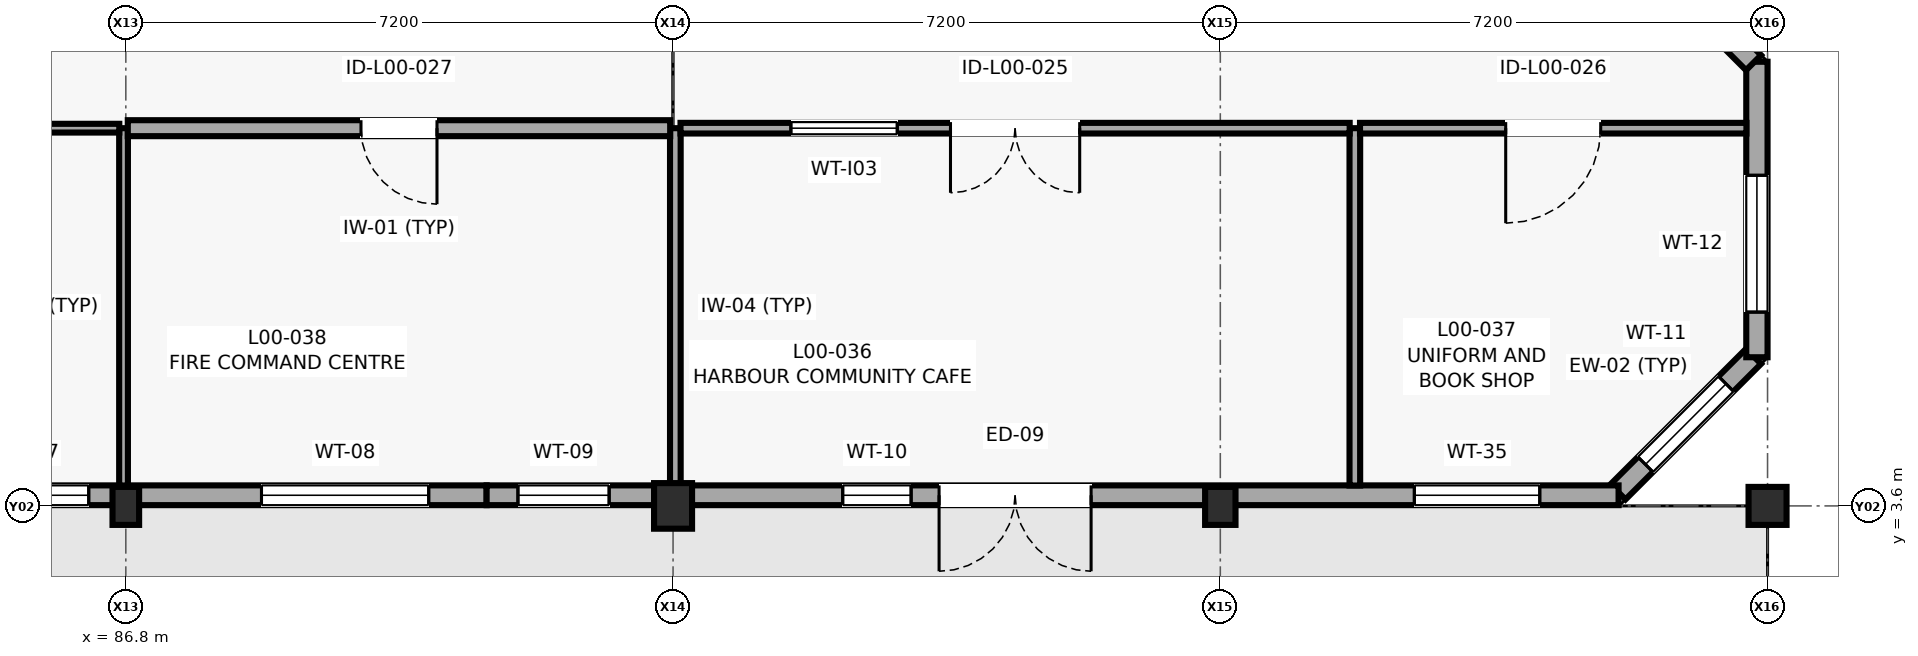
"""IFC4 building model, lengths in metres.
Left out: names, types, materials, properties, quantities, classifications, styles, units other than length and angle.
Written with IfcOpenShell. Run it as: python <this file> out.ifc"""

import sys

from ifc_helpers import new_model, si_unit, direction, frame, frame_2d, origin, origin_2d, place, context, subcontext, project, spatial, rectangle, extrude, element, fill, save


model = new_model("IFC4")
c1 = context("Model", 3, precision=1e-05, world=origin(), true_north=direction((0.0, 1.0)))
c2 = subcontext(c1, "Body", "Model", "MODEL_VIEW")
j1 = project(units=[si_unit("LENGTHUNIT", "METRE"), si_unit("PLANEANGLEUNIT", "RADIAN")], contexts=[c1])
p1 = place(None, origin())
s1 = spatial("IfcSite", under=j1, at=p1, CompositionType="ELEMENT")
p2 = place(p1, origin())
s2 = spatial("IfcBuilding", under=s1, at=p2, CompositionType="ELEMENT")
p3 = place(p2, origin())
s3 = spatial("IfcBuildingStorey", under=s2, at=p3, CompositionType="ELEMENT", Elevation=0.0)
p4 = place(p3, frame((86.8, 3.6, 0.0), z_axis=(0.0, 0.0, 1.0), x_axis=(1.0, 0.0, 0.0)))
e1 = element("IfcColumn", 1, at=p4, inside=s3, PredefinedType="PILASTER", context=c2, shape_type="SweptSolid", body=[
    extrude(rectangle(XDim=0.35, YDim=0.5, at=origin_2d()), origin(), (0.0, 0.0, 1.0), 4.2),
])
p5 = place(p3, frame((94.0, 3.6, 0.0), z_axis=(0.0, 0.0, 1.0), x_axis=(1.0, 0.0, 0.0)))
e2 = element("IfcColumn", 2, at=p5, inside=s3, PredefinedType="PILASTER", context=c2, shape_type="SweptSolid", body=[
    extrude(rectangle(XDim=0.5, YDim=0.6, at=origin_2d()), origin(), (0.0, 0.0, 1.0), 4.2),
])
p6 = place(p3, frame((101.2, 3.6, 0.0), z_axis=(0.0, 0.0, 1.0), x_axis=(1.0, 0.0, 0.0)))
e3 = element("IfcColumn", 3, at=p6, inside=s3, PredefinedType="PILASTER", context=c2, shape_type="SweptSolid", body=[
    extrude(rectangle(XDim=0.4, YDim=0.5, at=origin_2d()), origin(), (0.0, 0.0, 1.0), 4.2),
])
p7 = place(p3, frame((108.4, 3.6, 0.0), z_axis=(0.0, 0.0, 1.0), x_axis=(1.0, 0.0, 0.0)))
e4 = element("IfcColumn", 4, at=p7, inside=s3, PredefinedType="COLUMN", context=c2, shape_type="SweptSolid", body=[
    extrude(rectangle(XDim=0.5, YDim=0.5, at=origin_2d()), origin(), (0.0, 0.0, 1.0), 4.2),
])
p8 = place(p3, frame((106.432, 3.784, 0.0), z_axis=(0.0, 0.0, 1.0), x_axis=(0.707106781187, 0.707106781187, 0.0)))
e5 = element("IfcWall", 5, at=p8, inside=s3, PredefinedType="SOLIDWALL", context=c2, shape_type="SweptSolid", body=[
    extrude(rectangle(XDim=2.523, YDim=0.28, at=frame_2d((1.262, 0.0))), origin(), (0.0, 0.0, 1.0), 3.98),
])
p9 = place(p8, frame((0.511, 0.0, 0.75)))
e6 = element("IfcOpeningElement", 6, at=p9, cuts=e5, PredefinedType="OPENING", context=c2, shape_type="SweptSolid", body=[
    extrude(rectangle(XDim=1.5, YDim=2.2, at=frame_2d((0.75, 1.1))), frame((0.0, 0.15, 0.0), z_axis=(0.0, -1.0, 0.0), x_axis=(1.0, 0.0, 0.0)), (0.0, 0.0, 1.0), 0.3),
])
p10 = place(p3, frame((108.26, 5.556, 0.0), z_axis=(0.0, 0.0, 1.0), x_axis=(0.0, 1.0, 0.0)))
e7 = element("IfcWall", 7, at=p10, inside=s3, PredefinedType="SOLIDWALL", context=c2, shape_type="SweptSolid", body=[
    extrude(rectangle(XDim=3.888, YDim=0.28, at=frame_2d((1.944, 0.0))), origin(), (0.0, 0.0, 1.0), 3.98),
])
p11 = place(p10, frame((0.594, 0.0, 0.75)))
e8 = element("IfcOpeningElement", 8, at=p11, cuts=e7, PredefinedType="OPENING", context=c2, shape_type="SweptSolid", body=[
    extrude(rectangle(XDim=1.8, YDim=2.25, at=frame_2d((0.9, 1.125))), frame((0.0, 0.15, 0.0), z_axis=(0.0, -1.0, 0.0), x_axis=(1.0, 0.0, 0.0)), (0.0, 0.0, 1.0), 0.3),
])
p12 = place(p3, frame((108.216, 9.432, 0.0), z_axis=(0.0, 0.0, 1.0), x_axis=(-0.707106781187, 0.707106781187, 0.0)))
e9 = element("IfcWall", 9, at=p12, inside=s3, PredefinedType="SOLIDWALL", context=c2, shape_type="SweptSolid", body=[
    extrude(rectangle(XDim=2.523, YDim=0.28, at=frame_2d((1.262, 0.0))), origin(), (0.0, 0.0, 1.0), 3.98),
])
p13 = place(p12, frame((0.561, 0.0, 0.75)))
e10 = element("IfcOpeningElement", 10, at=p13, cuts=e9, PredefinedType="OPENING", context=c2, shape_type="SweptSolid", body=[
    extrude(rectangle(XDim=1.4, YDim=2.4, at=frame_2d((0.7, 1.2))), frame((0.0, 0.15, 0.0), z_axis=(0.0, -1.0, 0.0), x_axis=(1.0, 0.0, 0.0)), (0.0, 0.0, 1.0), 0.3),
])
p14 = place(p3, frame((76.654, 3.74, 0.0), z_axis=(0.0, 0.0, 1.0), x_axis=(1.0, 0.0, 0.0)))
e11 = element("IfcWall", 11, at=p14, inside=s3, PredefinedType="SOLIDWALL", context=c2, shape_type="SweptSolid", body=[
    extrude(rectangle(XDim=14.893, YDim=0.26, at=frame_2d((7.447, 0.0))), origin(), (0.0, 0.0, 1.0), 3.205),
])
p15 = place(p14, frame((3.446, 0.0, 0.0)))
e12 = element("IfcOpeningElement", 12, at=p15, cuts=e11, PredefinedType="OPENING", context=c2, shape_type="SweptSolid", body=[
    extrude(rectangle(XDim=1.8, YDim=2.4, at=frame_2d((0.9, 1.2))), frame((0.0, 0.14, 0.0), z_axis=(0.0, -1.0, 0.0), x_axis=(1.0, 0.0, 0.0)), (0.0, 0.0, 1.0), 0.28),
])
p16 = place(p14, frame((0.837, 0.0, 1.05)))
e13 = element("IfcOpeningElement", 13, at=p16, cuts=e11, PredefinedType="OPENING", context=c2, shape_type="SweptSolid", body=[
    extrude(rectangle(XDim=1.15, YDim=1.4, at=frame_2d((0.575, 0.7))), frame((0.0, 0.14, 0.0), z_axis=(0.0, -1.0, 0.0), x_axis=(1.0, 0.0, 0.0)), (0.0, 0.0, 1.0), 0.28),
])
p17 = place(p14, frame((5.91, 0.0, 1.05)))
e14 = element("IfcOpeningElement", 14, at=p17, cuts=e11, PredefinedType="OPENING", context=c2, shape_type="SweptSolid", body=[
    extrude(rectangle(XDim=1.05, YDim=1.3, at=frame_2d((0.525, 0.65))), frame((0.0, 0.14, 0.0), z_axis=(0.0, -1.0, 0.0), x_axis=(1.0, 0.0, 0.0)), (0.0, 0.0, 1.0), 0.28),
])
p18 = place(p14, frame((8.058, 0.0, 1.05)))
e15 = element("IfcOpeningElement", 15, at=p18, cuts=e11, PredefinedType="OPENING", context=c2, shape_type="SweptSolid", body=[
    extrude(rectangle(XDim=1.6, YDim=1.35, at=frame_2d((0.8, 0.675))), frame((0.0, 0.14, 0.0), z_axis=(0.0, -1.0, 0.0), x_axis=(1.0, 0.0, 0.0)), (0.0, 0.0, 1.0), 0.28),
])
p19 = place(p14, frame((11.931, 0.0, 1.05)))
e16 = element("IfcOpeningElement", 16, at=p19, cuts=e11, PredefinedType="OPENING", context=c2, shape_type="SweptSolid", body=[
    extrude(rectangle(XDim=2.2, YDim=1.35, at=frame_2d((1.1, 0.675))), frame((0.0, 0.14, 0.0), z_axis=(0.0, -1.0, 0.0), x_axis=(1.0, 0.0, 0.0)), (0.0, 0.0, 1.0), 0.28),
])
p20 = place(p3, frame((91.547, 3.74, 0.0), z_axis=(0.0, 0.0, 1.0), x_axis=(1.0, 0.0, 0.0)))
e17 = element("IfcWall", 17, at=p20, inside=s3, PredefinedType="SOLIDWALL", context=c2, shape_type="SweptSolid", body=[
    extrude(rectangle(XDim=14.893, YDim=0.26, at=frame_2d((7.446, 0.0))), origin(), (0.0, 0.0, 1.0), 3.155),
])
p21 = place(p20, frame((5.953, 0.0, 0.0)))
e18 = element("IfcOpeningElement", 18, at=p21, cuts=e17, PredefinedType="OPENING", context=c2, shape_type="SweptSolid", body=[
    extrude(rectangle(XDim=2.0, YDim=2.5, at=frame_2d((1.0, 1.25))), frame((0.0, 0.14, 0.0), z_axis=(0.0, -1.0, 0.0), x_axis=(1.0, 0.0, 0.0)), (0.0, 0.0, 1.0), 0.28),
])
p22 = place(p20, frame((0.412, 0.0, 1.05)))
e19 = element("IfcOpeningElement", 19, at=p22, cuts=e17, PredefinedType="OPENING", context=c2, shape_type="SweptSolid", body=[
    extrude(rectangle(XDim=1.2, YDim=0.9, at=frame_2d((0.6, 0.45))), frame((0.0, 0.14, 0.0), z_axis=(0.0, -1.0, 0.0), x_axis=(1.0, 0.0, 0.0)), (0.0, 0.0, 1.0), 0.28),
])
p23 = place(p20, frame((4.685, 0.0, 1.05)))
e20 = element("IfcOpeningElement", 20, at=p23, cuts=e17, PredefinedType="OPENING", context=c2, shape_type="SweptSolid", body=[
    extrude(rectangle(XDim=0.9, YDim=0.9, at=frame_2d((0.45, 0.45))), frame((0.0, 0.14, 0.0), z_axis=(0.0, -1.0, 0.0), x_axis=(1.0, 0.0, 0.0)), (0.0, 0.0, 1.0), 0.28),
])
p24 = place(p20, frame((12.206, 0.0, 1.05)))
e21 = element("IfcOpeningElement", 21, at=p24, cuts=e17, PredefinedType="OPENING", context=c2, shape_type="SweptSolid", body=[
    extrude(rectangle(XDim=1.65, YDim=1.25, at=frame_2d((0.825, 0.625))), frame((0.0, 0.14, 0.0), z_axis=(0.0, -1.0, 0.0), x_axis=(1.0, 0.0, 0.0)), (0.0, 0.0, 1.0), 0.28),
])
p25 = place(p3, frame((86.77, 3.868, 0.0), z_axis=(0.0, 0.0, 1.0), x_axis=(0.0, 1.0, 0.0)))
e22 = element("IfcWall", 22, at=p25, inside=s3, PredefinedType="PARTITIONING", context=c2, shape_type="SweptSolid", body=[
    extrude(rectangle(XDim=4.702, YDim=0.115, at=frame_2d((2.351, 0.0))), origin(), (0.0, 0.0, 1.0), 3.455),
])
p26 = place(p3, frame((86.714, 8.57, 0.0), z_axis=(0.0, 0.0, 1.0), x_axis=(-1.0, 0.0, 0.0)))
e23 = element("IfcWall", 23, at=p26, inside=s3, PredefinedType="PARTITIONING", context=c2, shape_type="SweptSolid", body=[
    extrude(rectangle(XDim=18.271, YDim=0.115, at=frame_2d((9.135, 0.0))), origin(), (0.0, 0.0, 1.0), 3.955),
])
p27 = place(p26, frame((8.661, 0.0, 0.0)))
e24 = element("IfcOpeningElement", 24, at=p27, cuts=e23, PredefinedType="OPENING", context=c2, shape_type="SweptSolid", body=[
    extrude(rectangle(XDim=0.95, YDim=2.05, at=frame_2d((0.475, 1.025))), frame((0.0, 0.067, 0.0), z_axis=(0.0, -1.0, 0.0), x_axis=(1.0, 0.0, 0.0)), (0.0, 0.0, 1.0), 0.135),
])
p28 = place(p26, frame((10.311, 0.0, 1.05)))
e25 = element("IfcOpeningElement", 25, at=p28, cuts=e23, PredefinedType="OPENING", context=c2, shape_type="SweptSolid", body=[
    extrude(rectangle(XDim=1.8, YDim=1.2, at=frame_2d((0.9, 0.6))), frame((0.0, 0.067, 0.0), z_axis=(0.0, -1.0, 0.0), x_axis=(1.0, 0.0, 0.0)), (0.0, 0.0, 1.0), 0.135),
])
p29 = place(p3, frame((94.03, 8.57, 0.0), z_axis=(0.0, 0.0, 1.0), x_axis=(0.0, -1.0, 0.0)))
e26 = element("IfcWall", 26, at=p29, inside=s3, PredefinedType="PARTITIONING", context=c2, shape_type="SweptSolid", body=[
    extrude(rectangle(XDim=4.702, YDim=0.14, at=frame_2d((2.351, 0.0))), origin(), (0.0, 0.0, 1.0), 3.455),
])
p30 = place(p3, frame((102.97, 3.868, 0.0), z_axis=(0.0, 0.0, 1.0), x_axis=(0.0, 1.0, 0.0)))
e27 = element("IfcWall", 27, at=p30, inside=s3, PredefinedType="PARTITIONING", context=c2, shape_type="SweptSolid", body=[
    extrude(rectangle(XDim=4.702, YDim=0.14, at=frame_2d((2.351, 0.0))), origin(), (0.0, 0.0, 1.0), 3.955),
])
p31 = place(p3, frame((102.902, 8.57, 0.0), z_axis=(0.0, 0.0, 1.0), x_axis=(-1.0, 0.0, 0.0)))
e28 = element("IfcWall", 28, at=p31, inside=s3, PredefinedType="PARTITIONING", context=c2, shape_type="SweptSolid", body=[
    extrude(rectangle(XDim=8.804, YDim=0.14, at=frame_2d((4.402, 0.0))), origin(), (0.0, 0.0, 1.0), 3.955),
])
p32 = place(p31, frame((3.552, 0.0, 0.0)))
e29 = element("IfcOpeningElement", 29, at=p32, cuts=e28, PredefinedType="OPENING", context=c2, shape_type="SweptSolid", body=[
    extrude(rectangle(XDim=1.7, YDim=2.35, at=frame_2d((0.85, 1.175))), frame((0.0, 0.08, 0.0), z_axis=(0.0, -1.0, 0.0), x_axis=(1.0, 0.0, 0.0)), (0.0, 0.0, 1.0), 0.16),
])
p33 = place(p31, frame((5.952, 0.0, 1.05)))
e30 = element("IfcOpeningElement", 30, at=p33, cuts=e28, PredefinedType="OPENING", context=c2, shape_type="SweptSolid", body=[
    extrude(rectangle(XDim=1.4, YDim=1.05, at=frame_2d((0.7, 0.525))), frame((0.0, 0.08, 0.0), z_axis=(0.0, -1.0, 0.0), x_axis=(1.0, 0.0, 0.0)), (0.0, 0.0, 1.0), 0.16),
])
p34 = place(p3, frame((108.122, 8.57, 0.0), z_axis=(0.0, 0.0, 1.0), x_axis=(-1.0, 0.0, 0.0)))
e31 = element("IfcWall", 31, at=p34, inside=s3, PredefinedType="PARTITIONING", context=c2, shape_type="SweptSolid", body=[
    extrude(rectangle(XDim=5.084, YDim=0.14, at=frame_2d((2.542, 0.0))), origin(), (0.0, 0.0, 1.0), 3.955),
])
p35 = place(p34, frame((1.917, 0.0, 0.0)))
e32 = element("IfcOpeningElement", 32, at=p35, cuts=e31, PredefinedType="OPENING", context=c2, shape_type="SweptSolid", body=[
    extrude(rectangle(XDim=1.25, YDim=2.22, at=frame_2d((0.625, 1.11))), frame((0.0, 0.08, 0.0), z_axis=(0.0, -1.0, 0.0), x_axis=(1.0, 0.0, 0.0)), (0.0, 0.0, 1.0), 0.16),
])
p36 = place(p3, frame((93.962, 8.57, 0.0), z_axis=(0.0, 0.0, 1.0), x_axis=(-1.0, 0.0, 0.0)))
e33 = element("IfcWall", 33, at=p36, inside=s3, PredefinedType="PARTITIONING", context=c2, shape_type="SweptSolid", body=[
    extrude(rectangle(XDim=7.136, YDim=0.21, at=frame_2d((3.568, 0.0))), origin(), (0.0, 0.0, 1.0), 3.955),
])
p37 = place(p36, frame((3.068, 0.0, 0.0)))
e34 = element("IfcOpeningElement", 34, at=p37, cuts=e33, PredefinedType="OPENING", context=c2, shape_type="SweptSolid", body=[
    extrude(rectangle(XDim=1.0, YDim=2.15, at=frame_2d((0.5, 1.075))), frame((0.0, 0.115, 0.0), z_axis=(0.0, -1.0, 0.0), x_axis=(1.0, 0.0, 0.0)), (0.0, 0.0, 1.0), 0.23),
])
p38 = place(p21, frame((2.0, 0.0, 0.0), z_axis=(0.0, 0.0, 1.0), x_axis=(-1.0, 0.0, 0.0)))
e35 = element("IfcDoor", 35, at=p38, inside=s3, OperationType="DOUBLE_DOOR_SINGLE_SWING", PredefinedType="DOOR", context=c2, shape_type="SweptSolid", body=[
    extrude(rectangle(XDim=2.0, YDim=2.5, at=frame_2d((1.0, 1.25))), frame((0.0, 0.025, 0.0), z_axis=(0.0, -1.0, 0.0), x_axis=(1.0, 0.0, 0.0)), (0.0, 0.0, 1.0), 0.05),
])
fill(e18, e35)
p39 = place(p9, origin())
e36 = element("IfcWindow", 36, at=p39, inside=s3, PartitioningType="SINGLE_PANEL", PredefinedType="WINDOW", context=c2, shape_type="SweptSolid", body=[
    extrude(rectangle(XDim=1.5, YDim=2.2, at=frame_2d((0.75, 1.1))), frame((0.0, 0.03, 0.0), z_axis=(0.0, -1.0, 0.0), x_axis=(1.0, 0.0, 0.0)), (0.0, 0.0, 1.0), 0.06),
])
fill(e6, e36)
p40 = place(p11, origin())
e37 = element("IfcWindow", 37, at=p40, inside=s3, PartitioningType="SINGLE_PANEL", PredefinedType="WINDOW", context=c2, shape_type="SweptSolid", body=[
    extrude(rectangle(XDim=1.8, YDim=2.25, at=frame_2d((0.9, 1.125))), frame((0.0, 0.03, 0.0), z_axis=(0.0, -1.0, 0.0), x_axis=(1.0, 0.0, 0.0)), (0.0, 0.0, 1.0), 0.06),
])
fill(e8, e37)
p41 = place(p18, origin())
e38 = element("IfcWindow", 38, at=p41, inside=s3, PartitioningType="SINGLE_PANEL", PredefinedType="WINDOW", context=c2, shape_type="SweptSolid", body=[
    extrude(rectangle(XDim=1.6, YDim=1.35, at=frame_2d((0.8, 0.675))), frame((0.0, 0.03, 0.0), z_axis=(0.0, -1.0, 0.0), x_axis=(1.0, 0.0, 0.0)), (0.0, 0.0, 1.0), 0.06),
])
fill(e15, e38)
p42 = place(p19, origin())
e39 = element("IfcWindow", 39, at=p42, inside=s3, PartitioningType="SINGLE_PANEL", PredefinedType="WINDOW", context=c2, shape_type="SweptSolid", body=[
    extrude(rectangle(XDim=2.2, YDim=1.35, at=frame_2d((1.1, 0.675))), frame((0.0, 0.03, 0.0), z_axis=(0.0, -1.0, 0.0), x_axis=(1.0, 0.0, 0.0)), (0.0, 0.0, 1.0), 0.06),
])
fill(e16, e39)
p43 = place(p22, origin())
e40 = element("IfcWindow", 40, at=p43, inside=s3, PartitioningType="SINGLE_PANEL", PredefinedType="WINDOW", context=c2, shape_type="SweptSolid", body=[
    extrude(rectangle(XDim=1.2, YDim=0.9, at=frame_2d((0.6, 0.45))), frame((0.0, 0.03, 0.0), z_axis=(0.0, -1.0, 0.0), x_axis=(1.0, 0.0, 0.0)), (0.0, 0.0, 1.0), 0.06),
])
fill(e19, e40)
p44 = place(p23, origin())
e41 = element("IfcWindow", 41, at=p44, inside=s3, PartitioningType="SINGLE_PANEL", PredefinedType="WINDOW", context=c2, shape_type="SweptSolid", body=[
    extrude(rectangle(XDim=0.9, YDim=0.9, at=frame_2d((0.45, 0.45))), frame((0.0, 0.03, 0.0), z_axis=(0.0, -1.0, 0.0), x_axis=(1.0, 0.0, 0.0)), (0.0, 0.0, 1.0), 0.06),
])
fill(e20, e41)
p45 = place(p24, origin())
e42 = element("IfcWindow", 42, at=p45, inside=s3, PartitioningType="SINGLE_PANEL", PredefinedType="WINDOW", context=c2, shape_type="SweptSolid", body=[
    extrude(rectangle(XDim=1.65, YDim=1.25, at=frame_2d((0.825, 0.625))), frame((0.0, 0.03, 0.0), z_axis=(0.0, -1.0, 0.0), x_axis=(1.0, 0.0, 0.0)), (0.0, 0.0, 1.0), 0.06),
])
fill(e21, e42)
p46 = place(p32, origin())
e43 = element("IfcDoor", 43, at=p46, inside=s3, OperationType="DOUBLE_DOOR_SINGLE_SWING", PredefinedType="DOOR", context=c2, shape_type="SweptSolid", body=[
    extrude(rectangle(XDim=1.7, YDim=2.35, at=frame_2d((0.85, 1.175))), frame((0.0, 0.025, 0.0), z_axis=(0.0, -1.0, 0.0), x_axis=(1.0, 0.0, 0.0)), (0.0, 0.0, 1.0), 0.05),
])
fill(e29, e43)
p47 = place(p33, origin())
e44 = element("IfcWindow", 44, at=p47, inside=s3, PartitioningType="SINGLE_PANEL", PredefinedType="WINDOW", context=c2, shape_type="SweptSolid", body=[
    extrude(rectangle(XDim=1.4, YDim=1.05, at=frame_2d((0.7, 0.525))), frame((0.0, 0.03, 0.0), z_axis=(0.0, -1.0, 0.0), x_axis=(1.0, 0.0, 0.0)), (0.0, 0.0, 1.0), 0.06),
])
fill(e30, e44)
p48 = place(p35, origin())
e45 = element("IfcDoor", 45, at=p48, inside=s3, OperationType="SINGLE_SWING_RIGHT", PredefinedType="DOOR", context=c2, shape_type="SweptSolid", body=[
    extrude(rectangle(XDim=1.25, YDim=2.22, at=frame_2d((0.625, 1.11))), frame((0.0, 0.025, 0.0), z_axis=(0.0, -1.0, 0.0), x_axis=(1.0, 0.0, 0.0)), (0.0, 0.0, 1.0), 0.05),
])
fill(e32, e45)
p49 = place(p37, origin())
e46 = element("IfcDoor", 46, at=p49, inside=s3, OperationType="SINGLE_SWING_LEFT", PredefinedType="DOOR", context=c2, shape_type="SweptSolid", body=[
    extrude(rectangle(XDim=1.0, YDim=2.15, at=frame_2d((0.5, 1.075))), frame((0.0, 0.025, 0.0), z_axis=(0.0, -1.0, 0.0), x_axis=(1.0, 0.0, 0.0)), (0.0, 0.0, 1.0), 0.05),
])
fill(e34, e46)
save(model, sys.argv[1])
